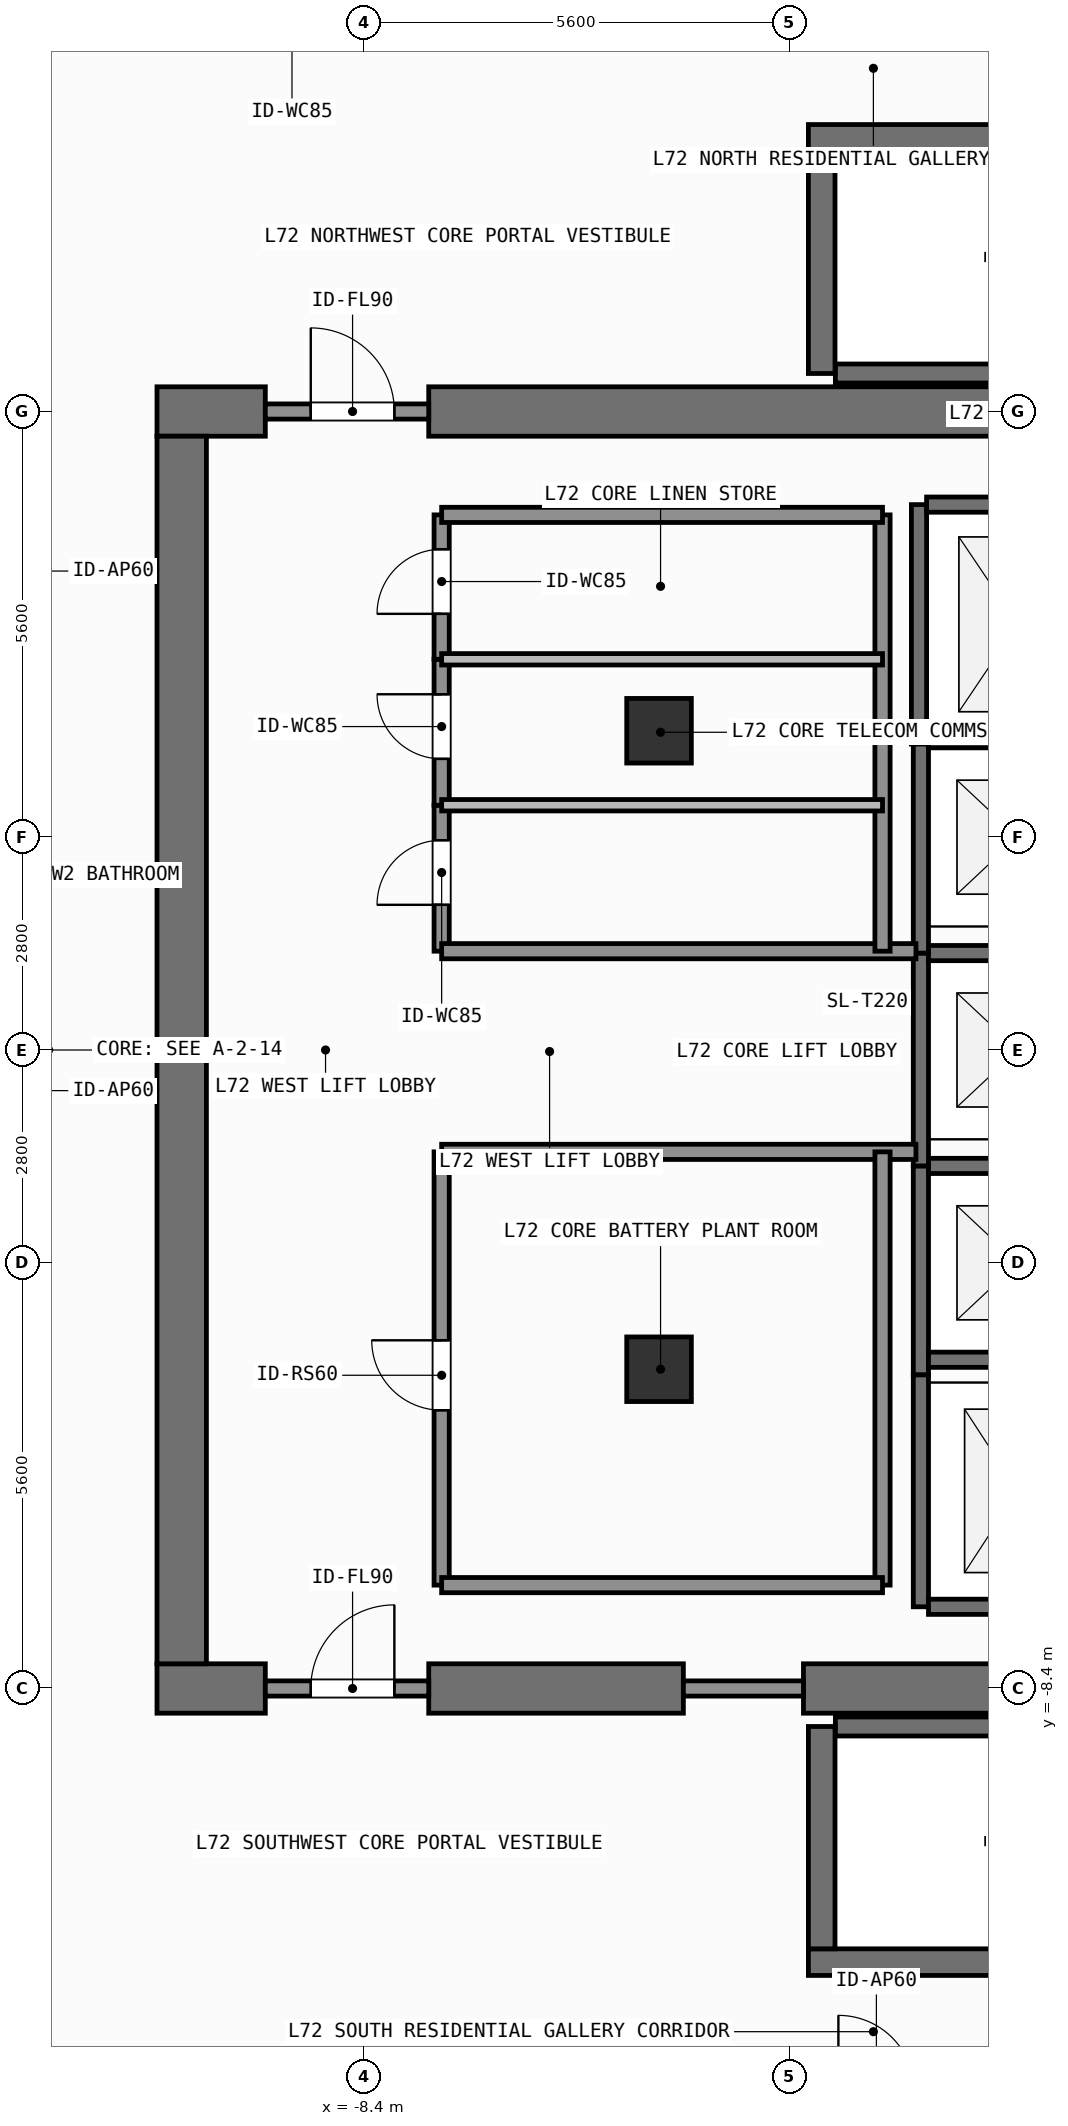
"""IFC4 building model, lengths in metres.
Left out: names, types, materials, properties, quantities, classifications, styles, units other than length and angle.
Written with IfcOpenShell. Run it as: python <this file> out.ifc"""

import sys

from ifc_helpers import new_model, si_unit, direction, frame, frame_2d, origin, origin_2d, place, context, subcontext, project, spatial, rectangle, extrude, element, fill, save


model = new_model("IFC4")
c1 = context("Model", 3, precision=1e-05, world=origin(), true_north=direction((0.0, 1.0)))
c2 = subcontext(c1, "Body", "Model", "MODEL_VIEW")
j1 = project(units=[si_unit("LENGTHUNIT", "METRE"), si_unit("PLANEANGLEUNIT", "RADIAN")], contexts=[c1])
p1 = place(None, origin())
s1 = spatial("IfcSite", under=j1, at=p1, CompositionType="ELEMENT")
p2 = place(p1, origin())
s2 = spatial("IfcBuilding", under=s1, at=p2, CompositionType="ELEMENT")
p3 = place(p2, frame((0.0, 0.0, 293.7)))
s3 = spatial("IfcBuildingStorey", under=s2, at=p3, CompositionType="ELEMENT", Elevation=293.7)
p4 = place(p3, frame((-11.125, -8.4, 0.0), z_axis=(0.0, 0.0, 1.0), x_axis=(1.0, 0.0, 0.0)))
e1 = element("IfcWall", 1, at=p4, inside=s3, PredefinedType="SHEAR", context=c2, shape_type="SweptSolid", body=[
    extrude(rectangle(XDim=1.425, YDim=0.65, at=frame_2d((0.712, 0.0))), origin(), (0.0, 0.0, 1.0), 3.9),
])
p5 = place(p3, frame((-7.55, -8.4, 0.0), z_axis=(0.0, 0.0, 1.0), x_axis=(1.0, 0.0, 0.0)))
e2 = element("IfcWall", 2, at=p5, inside=s3, PredefinedType="SHEAR", context=c2, shape_type="SweptSolid", body=[
    extrude(rectangle(XDim=3.35, YDim=0.65, at=frame_2d((1.675, 0.0))), origin(), (0.0, 0.0, 1.0), 3.9),
])
p6 = place(p3, frame((-2.62, -8.4, 0.0), z_axis=(0.0, 0.0, 1.0), x_axis=(1.0, 0.0, 0.0)))
e3 = element("IfcWall", 3, at=p6, inside=s3, PredefinedType="SHEAR", context=c2, shape_type="SweptSolid", body=[
    extrude(rectangle(XDim=7.27, YDim=0.65, at=frame_2d((3.635, 0.0))), origin(), (0.0, 0.0, 1.0), 3.9),
])
p7 = place(p3, frame((-11.125, 8.4, 0.0), z_axis=(0.0, 0.0, 1.0), x_axis=(1.0, 0.0, 0.0)))
e4 = element("IfcWall", 4, at=p7, inside=s3, PredefinedType="SHEAR", context=c2, shape_type="SweptSolid", body=[
    extrude(rectangle(XDim=1.425, YDim=0.65, at=frame_2d((0.712, 0.0))), origin(), (0.0, 0.0, 1.0), 3.9),
])
p8 = place(p3, frame((-7.55, 8.4, 0.0), z_axis=(0.0, 0.0, 1.0), x_axis=(1.0, 0.0, 0.0)))
e5 = element("IfcWall", 5, at=p8, inside=s3, PredefinedType="SHEAR", context=c2, shape_type="SweptSolid", body=[
    extrude(rectangle(XDim=16.275, YDim=0.65, at=frame_2d((8.138, 0.0))), origin(), (0.0, 0.0, 1.0), 3.9),
])
p9 = place(p3, frame((-10.8, -8.075, 0.0), z_axis=(0.0, 0.0, 1.0), x_axis=(0.0, 1.0, 0.0)))
e6 = element("IfcWall", 6, at=p9, inside=s3, PredefinedType="SHEAR", context=c2, shape_type="SweptSolid", body=[
    extrude(rectangle(XDim=16.15, YDim=0.65, at=frame_2d((8.075, 0.0))), origin(), (0.0, 0.0, 1.0), 3.9),
])
p10 = place(p3, frame((-2.555, -12.0, 0.0), z_axis=(0.0, 0.0, 1.0), x_axis=(1.0, 0.0, 0.0)))
e7 = element("IfcWall", 7, at=p10, inside=s3, PredefinedType="SHEAR", context=c2, shape_type="SweptSolid", body=[
    extrude(rectangle(XDim=7.31, YDim=0.35, at=frame_2d((3.655, 0.0))), origin(), (0.0, 0.0, 1.0), 3.9),
])
p11 = place(p3, frame((-2.2, -8.9, 0.0), z_axis=(0.0, 0.0, 1.0), x_axis=(1.0, 0.0, 0.0)))
e8 = element("IfcWall", 8, at=p11, inside=s3, PredefinedType="SHEAR", context=c2, shape_type="SweptSolid", body=[
    extrude(rectangle(XDim=6.6, YDim=0.25, at=frame_2d((3.3, 0.0))), origin(), (0.0, 0.0, 1.0), 3.9),
])
p12 = place(p3, frame((-2.38, -11.825, 0.0), z_axis=(0.0, 0.0, 1.0), x_axis=(0.0, 1.0, 0.0)))
e9 = element("IfcWall", 9, at=p12, inside=s3, PredefinedType="SHEAR", context=c2, shape_type="SweptSolid", body=[
    extrude(rectangle(XDim=2.925, YDim=0.35, at=frame_2d((1.462, 0.0))), origin(), (0.0, 0.0, 1.0), 3.9),
])
p13 = place(p3, frame((-2.555, 12.0, 0.0), z_axis=(0.0, 0.0, 1.0), x_axis=(1.0, 0.0, 0.0)))
e10 = element("IfcWall", 10, at=p13, inside=s3, PredefinedType="SHEAR", context=c2, shape_type="SweptSolid", body=[
    extrude(rectangle(XDim=7.31, YDim=0.35, at=frame_2d((3.655, 0.0))), origin(), (0.0, 0.0, 1.0), 3.9),
])
p14 = place(p3, frame((-2.2, 8.9, 0.0), z_axis=(0.0, 0.0, 1.0), x_axis=(1.0, 0.0, 0.0)))
e11 = element("IfcWall", 11, at=p14, inside=s3, PredefinedType="SHEAR", context=c2, shape_type="SweptSolid", body=[
    extrude(rectangle(XDim=6.6, YDim=0.25, at=frame_2d((3.3, 0.0))), origin(), (0.0, 0.0, 1.0), 3.9),
])
p15 = place(p3, frame((-2.38, 8.9, 0.0), z_axis=(0.0, 0.0, 1.0), x_axis=(0.0, 1.0, 0.0)))
e12 = element("IfcWall", 12, at=p15, inside=s3, PredefinedType="SHEAR", context=c2, shape_type="SweptSolid", body=[
    extrude(rectangle(XDim=2.925, YDim=0.35, at=frame_2d((1.462, 0.0))), origin(), (0.0, 0.0, 1.0), 3.9),
])
for number, where, z_axis, x_axis in (
    (13, (-4.52, -4.2, 0.0), (0.0, 0.0, 1.0), (1.0, 0.0, 0.0)),
    (14, (-4.52, 4.2, 0.0), (0.0, 0.0, 1.0), (1.0, 0.0, 0.0)),
):
    element("IfcColumn", number, at=place(p3, frame(where, z_axis=z_axis, x_axis=x_axis)), inside=s3, PredefinedType="COLUMN", context=c2, shape_type="SweptSolid", body=[
        extrude(rectangle(XDim=0.85, YDim=0.85, at=origin_2d()), origin(), (0.0, 0.0, 1.0), 3.9),
    ])
p16 = place(p3, frame((-1.075, -4.275, 0.0), z_axis=(0.0, 0.0, 1.0), x_axis=(0.0, 1.0, 0.0)))
e15 = element("IfcWall", 15, at=p16, inside=s3, PredefinedType="SHEAR", context=c2, shape_type="SweptSolid", body=[
    extrude(rectangle(XDim=2.75, YDim=0.2, at=frame_2d((1.375, 0.0))), origin(), (0.0, 0.0, 1.0), 3.68),
])
for number, where, z_axis, x_axis in (
    (16, (-0.975, -4.075, 0.0), (0.0, 0.0, 1.0), (1.0, 0.0, 0.0)),
    (17, (-0.975, -1.525, 0.0), (0.0, 0.0, 1.0), (1.0, 0.0, 0.0)),
):
    element("IfcWall", number, at=place(p3, frame(where, z_axis=z_axis, x_axis=x_axis)), inside=s3, PredefinedType="SHEAR", context=c2, shape_type="SweptSolid", body=[
        extrude(rectangle(XDim=2.35, YDim=0.2, at=frame_2d((1.175, 0.0))), origin(), (0.0, 0.0, 1.0), 3.68),
    ])
p17 = place(p3, frame((-1.075, -1.525, 0.0), z_axis=(0.0, 0.0, 1.0), x_axis=(0.0, 1.0, 0.0)))
e18 = element("IfcWall", 18, at=p17, inside=s3, PredefinedType="SHEAR", context=c2, shape_type="SweptSolid", body=[
    extrude(rectangle(XDim=2.8, YDim=0.2, at=frame_2d((1.4, 0.0))), origin(), (0.0, 0.0, 1.0), 3.68),
])
p18 = place(p3, frame((-0.975, 1.275, 0.0), z_axis=(0.0, 0.0, 1.0), x_axis=(1.0, 0.0, 0.0)))
e19 = element("IfcWall", 19, at=p18, inside=s3, PredefinedType="SHEAR", context=c2, shape_type="SweptSolid", body=[
    extrude(rectangle(XDim=2.35, YDim=0.2, at=frame_2d((1.175, 0.0))), origin(), (0.0, 0.0, 1.0), 3.68),
])
p19 = place(p3, frame((-1.075, 1.275, 0.0), z_axis=(0.0, 0.0, 1.0), x_axis=(0.0, 1.0, 0.0)))
e20 = element("IfcWall", 20, at=p19, inside=s3, PredefinedType="SHEAR", context=c2, shape_type="SweptSolid", body=[
    extrude(rectangle(XDim=2.8, YDim=0.2, at=frame_2d((1.4, 0.0))), origin(), (0.0, 0.0, 1.0), 3.68),
])
p20 = place(p3, frame((-0.975, 4.075, 0.0), z_axis=(0.0, 0.0, 1.0), x_axis=(1.0, 0.0, 0.0)))
e21 = element("IfcWall", 21, at=p20, inside=s3, PredefinedType="SHEAR", context=c2, shape_type="SweptSolid", body=[
    extrude(rectangle(XDim=2.35, YDim=0.2, at=frame_2d((1.175, 0.0))), origin(), (0.0, 0.0, 1.0), 3.68),
])
p21 = place(p3, frame((-1.1, 4.025, 0.0), z_axis=(0.0, 0.0, 1.0), x_axis=(0.0, 1.0, 0.0)))
e22 = element("IfcWall", 22, at=p21, inside=s3, PredefinedType="SHEAR", context=c2, shape_type="SweptSolid", body=[
    extrude(rectangle(XDim=3.15, YDim=0.2, at=frame_2d((1.575, 0.0))), origin(), (0.0, 0.0, 1.0), 3.68),
])
p22 = place(p3, frame((-1.0, 7.175, 0.0), z_axis=(0.0, 0.0, 1.0), x_axis=(1.0, 0.0, 0.0)))
e23 = element("IfcWall", 23, at=p22, inside=s3, PredefinedType="SHEAR", context=c2, shape_type="SweptSolid", body=[
    extrude(rectangle(XDim=2.4, YDim=0.2, at=frame_2d((1.2, 0.0))), origin(), (0.0, 0.0, 1.0), 3.68),
])
p23 = place(p3, frame((-1.075, -7.325, 0.0), z_axis=(0.0, 0.0, 1.0), x_axis=(0.0, 1.0, 0.0)))
e24 = element("IfcWall", 24, at=p23, inside=s3, PredefinedType="SHEAR", context=c2, shape_type="SweptSolid", body=[
    extrude(rectangle(XDim=3.05, YDim=0.2, at=frame_2d((1.525, 0.0))), origin(), (0.0, 0.0, 1.0), 3.68),
])
p24 = place(p3, frame((-0.975, -7.325, 0.0), z_axis=(0.0, 0.0, 1.0), x_axis=(1.0, 0.0, 0.0)))
e25 = element("IfcWall", 25, at=p24, inside=s3, PredefinedType="SHEAR", context=c2, shape_type="SweptSolid", body=[
    extrude(rectangle(XDim=2.35, YDim=0.2, at=frame_2d((1.175, 0.0))), origin(), (0.0, 0.0, 1.0), 3.68),
])
p25 = place(p3, frame((-9.7, -8.4, 0.0), z_axis=(0.0, 0.0, 1.0), x_axis=(1.0, 0.0, 0.0)))
e26 = element("IfcWall", 26, at=p25, inside=s3, PredefinedType="SOLIDWALL", context=c2, shape_type="SweptSolid", body=[
    extrude(rectangle(XDim=2.15, YDim=0.2, at=frame_2d((1.075, 0.0))), origin(), (0.0, 0.0, 1.0), 2.92),
])
p26 = place(p25, frame((0.598, 0.0, 0.0)))
e27 = element("IfcOpeningElement", 27, at=p26, cuts=e26, PredefinedType="OPENING", context=c2, shape_type="SweptSolid", body=[
    extrude(rectangle(XDim=1.1, YDim=2.15, at=frame_2d((0.55, 1.075))), frame((0.0, 0.11, 0.0), z_axis=(0.0, -1.0, 0.0), x_axis=(1.0, 0.0, 0.0)), (0.0, 0.0, 1.0), 0.22),
])
p27 = place(p3, frame((-9.7, 8.4, 0.0), z_axis=(0.0, 0.0, 1.0), x_axis=(1.0, 0.0, 0.0)))
e28 = element("IfcWall", 28, at=p27, inside=s3, PredefinedType="SOLIDWALL", context=c2, shape_type="SweptSolid", body=[
    extrude(rectangle(XDim=2.15, YDim=0.2, at=frame_2d((1.075, 0.0))), origin(), (0.0, 0.0, 1.0), 2.92),
])
p28 = place(p27, frame((0.598, 0.0, 0.0)))
e29 = element("IfcOpeningElement", 29, at=p28, cuts=e28, PredefinedType="OPENING", context=c2, shape_type="SweptSolid", body=[
    extrude(rectangle(XDim=1.1, YDim=2.15, at=frame_2d((0.55, 1.075))), frame((0.0, 0.11, 0.0), z_axis=(0.0, -1.0, 0.0), x_axis=(1.0, 0.0, 0.0)), (0.0, 0.0, 1.0), 0.22),
])
p29 = place(p3, frame((-7.38, -7.04, 0.0), z_axis=(0.0, 0.0, 1.0), x_axis=(0.0, 1.0, 0.0)))
e30 = element("IfcWall", 30, at=p29, inside=s3, PredefinedType="SOLIDWALL", context=c2, shape_type="SweptSolid", body=[
    extrude(rectangle(XDim=5.7, YDim=0.2, at=frame_2d((2.85, 0.0))), origin(), (0.0, 0.0, 1.0), 3.68),
])
p30 = place(p29, frame((2.301, 0.0, 0.0)))
e31 = element("IfcOpeningElement", 31, at=p30, cuts=e30, PredefinedType="OPENING", context=c2, shape_type="SweptSolid", body=[
    extrude(rectangle(XDim=0.92, YDim=2.1, at=frame_2d((0.46, 1.05))), frame((0.0, 0.11, 0.0), z_axis=(0.0, -1.0, 0.0), x_axis=(1.0, 0.0, 0.0)), (0.0, 0.0, 1.0), 0.22),
])
p31 = place(p3, frame((-7.38, 1.3, 0.0), z_axis=(0.0, 0.0, 1.0), x_axis=(0.0, 1.0, 0.0)))
e32 = element("IfcWall", 32, at=p31, inside=s3, PredefinedType="SOLIDWALL", context=c2, shape_type="SweptSolid", body=[
    extrude(rectangle(XDim=1.92, YDim=0.2, at=frame_2d((0.96, 0.0))), origin(), (0.0, 0.0, 1.0), 3.68),
])
p32 = place(p31, frame((0.61, 0.0, 0.0)))
e33 = element("IfcOpeningElement", 33, at=p32, cuts=e32, PredefinedType="OPENING", context=c2, shape_type="SweptSolid", body=[
    extrude(rectangle(XDim=0.85, YDim=2.1, at=frame_2d((0.425, 1.05))), frame((0.0, 0.11, 0.0), z_axis=(0.0, -1.0, 0.0), x_axis=(1.0, 0.0, 0.0)), (0.0, 0.0, 1.0), 0.22),
])
p33 = place(p3, frame((-7.38, 3.22, 0.0), z_axis=(0.0, 0.0, 1.0), x_axis=(0.0, 1.0, 0.0)))
e34 = element("IfcWall", 34, at=p33, inside=s3, PredefinedType="SOLIDWALL", context=c2, shape_type="SweptSolid", body=[
    extrude(rectangle(XDim=1.92, YDim=0.2, at=frame_2d((0.96, 0.0))), origin(), (0.0, 0.0, 1.0), 3.68),
])
p34 = place(p33, frame((0.61, 0.0, 0.0)))
e35 = element("IfcOpeningElement", 35, at=p34, cuts=e34, PredefinedType="OPENING", context=c2, shape_type="SweptSolid", body=[
    extrude(rectangle(XDim=0.85, YDim=2.1, at=frame_2d((0.425, 1.05))), frame((0.0, 0.11, 0.0), z_axis=(0.0, -1.0, 0.0), x_axis=(1.0, 0.0, 0.0)), (0.0, 0.0, 1.0), 0.22),
])
p35 = place(p3, frame((-7.38, 5.14, 0.0), z_axis=(0.0, 0.0, 1.0), x_axis=(0.0, 1.0, 0.0)))
e36 = element("IfcWall", 36, at=p35, inside=s3, PredefinedType="SOLIDWALL", context=c2, shape_type="SweptSolid", body=[
    extrude(rectangle(XDim=1.9, YDim=0.2, at=frame_2d((0.95, 0.0))), origin(), (0.0, 0.0, 1.0), 3.68),
])
p36 = place(p35, frame((0.598, 0.0, 0.0)))
e37 = element("IfcOpeningElement", 37, at=p36, cuts=e36, PredefinedType="OPENING", context=c2, shape_type="SweptSolid", body=[
    extrude(rectangle(XDim=0.85, YDim=2.1, at=frame_2d((0.425, 1.05))), frame((0.0, 0.11, 0.0), z_axis=(0.0, -1.0, 0.0), x_axis=(1.0, 0.0, 0.0)), (0.0, 0.0, 1.0), 0.22),
])
p37 = place(p3, frame((-4.2, -8.4, 0.0), z_axis=(0.0, 0.0, 1.0), x_axis=(1.0, 0.0, 0.0)))
e38 = element("IfcWall", 38, at=p37, inside=s3, PredefinedType="SOLIDWALL", context=c2, shape_type="SweptSolid", body=[
    extrude(rectangle(XDim=1.58, YDim=0.2, at=frame_2d((0.79, 0.0))), origin(), (0.0, 0.0, 1.0), 2.92),
])
for number, where, z_axis, x_axis in (
    (39, (-7.38, -1.34, 0.0), (0.0, 0.0, 1.0), (1.0, 0.0, 0.0)),
    (40, (-7.38, 1.3, 0.0), (0.0, 0.0, 1.0), (1.0, 0.0, 0.0)),
):
    element("IfcWall", number, at=place(p3, frame(where, z_axis=z_axis, x_axis=x_axis)), inside=s3, PredefinedType="SOLIDWALL", context=c2, shape_type="SweptSolid", body=[
        extrude(rectangle(XDim=6.24, YDim=0.2, at=frame_2d((3.12, 0.0))), origin(), (0.0, 0.0, 1.0), 3.68),
    ])
p38 = place(p3, frame((-1.58, -7.04, 0.0), z_axis=(0.0, 0.0, 1.0), x_axis=(0.0, 1.0, 0.0)))
e41 = element("IfcWall", 41, at=p38, inside=s3, PredefinedType="SOLIDWALL", context=c2, shape_type="SweptSolid", body=[
    extrude(rectangle(XDim=5.7, YDim=0.2, at=frame_2d((2.85, 0.0))), origin(), (0.0, 0.0, 1.0), 3.68),
])
p39 = place(p3, frame((-7.38, -7.04, 0.0), z_axis=(0.0, 0.0, 1.0), x_axis=(1.0, 0.0, 0.0)))
e42 = element("IfcWall", 42, at=p39, inside=s3, PredefinedType="SOLIDWALL", context=c2, shape_type="SweptSolid", body=[
    extrude(rectangle(XDim=5.8, YDim=0.2, at=frame_2d((2.9, 0.0))), origin(), (0.0, 0.0, 1.0), 3.68),
])
p40 = place(p3, frame((-1.58, 1.3, 0.0), z_axis=(0.0, 0.0, 1.0), x_axis=(0.0, 1.0, 0.0)))
e43 = element("IfcWall", 43, at=p40, inside=s3, PredefinedType="SOLIDWALL", context=c2, shape_type="SweptSolid", body=[
    extrude(rectangle(XDim=5.74, YDim=0.2, at=frame_2d((2.87, 0.0))), origin(), (0.0, 0.0, 1.0), 3.68),
])
p41 = place(p3, frame((-7.38, 7.04, 0.0), z_axis=(0.0, 0.0, 1.0), x_axis=(1.0, 0.0, 0.0)))
e44 = element("IfcWall", 44, at=p41, inside=s3, PredefinedType="SOLIDWALL", context=c2, shape_type="SweptSolid", body=[
    extrude(rectangle(XDim=5.8, YDim=0.2, at=frame_2d((2.9, 0.0))), origin(), (0.0, 0.0, 1.0), 3.68),
])
for number, where, z_axis, x_axis in (
    (45, (-7.38, 3.22, 0.0), (0.0, 0.0, 1.0), (1.0, 0.0, 0.0)),
    (46, (-7.38, 5.14, 0.0), (0.0, 0.0, 1.0), (1.0, 0.0, 0.0)),
):
    element("IfcWall", number, at=place(p3, frame(where, z_axis=z_axis, x_axis=x_axis)), inside=s3, PredefinedType="PARTITIONING", context=c2, shape_type="SweptSolid", body=[
        extrude(rectangle(XDim=5.8, YDim=0.15, at=frame_2d((2.9, 0.0))), origin(), (0.0, 0.0, 1.0), 3.68),
    ])
p42 = place(p26, origin())
e47 = element("IfcDoor", 47, at=p42, inside=s3, OperationType="SINGLE_SWING_RIGHT", PredefinedType="DOOR", context=c2, shape_type="SweptSolid", body=[
    extrude(rectangle(XDim=1.1, YDim=2.15, at=frame_2d((0.55, 1.075))), frame((0.0, 0.025, 0.0), z_axis=(0.0, -1.0, 0.0), x_axis=(1.0, 0.0, 0.0)), (0.0, 0.0, 1.0), 0.05),
])
fill(e27, e47)
p43 = place(p28, origin())
e48 = element("IfcDoor", 48, at=p43, inside=s3, OperationType="SINGLE_SWING_LEFT", PredefinedType="DOOR", context=c2, shape_type="SweptSolid", body=[
    extrude(rectangle(XDim=1.1, YDim=2.15, at=frame_2d((0.55, 1.075))), frame((0.0, 0.025, 0.0), z_axis=(0.0, -1.0, 0.0), x_axis=(1.0, 0.0, 0.0)), (0.0, 0.0, 1.0), 0.05),
])
fill(e29, e48)
p44 = place(p30, origin())
e49 = element("IfcDoor", 49, at=p44, inside=s3, OperationType="SINGLE_SWING_RIGHT", PredefinedType="DOOR", context=c2, shape_type="SweptSolid", body=[
    extrude(rectangle(XDim=0.92, YDim=2.1, at=frame_2d((0.46, 1.05))), frame((0.0, 0.025, 0.0), z_axis=(0.0, -1.0, 0.0), x_axis=(1.0, 0.0, 0.0)), (0.0, 0.0, 1.0), 0.05),
])
fill(e31, e49)
p45 = place(p32, origin())
e50 = element("IfcDoor", 50, at=p45, inside=s3, OperationType="SINGLE_SWING_LEFT", PredefinedType="DOOR", context=c2, shape_type="SweptSolid", body=[
    extrude(rectangle(XDim=0.85, YDim=2.1, at=frame_2d((0.425, 1.05))), frame((0.0, 0.025, 0.0), z_axis=(0.0, -1.0, 0.0), x_axis=(1.0, 0.0, 0.0)), (0.0, 0.0, 1.0), 0.05),
])
fill(e33, e50)
p46 = place(p34, origin())
e51 = element("IfcDoor", 51, at=p46, inside=s3, OperationType="SINGLE_SWING_RIGHT", PredefinedType="DOOR", context=c2, shape_type="SweptSolid", body=[
    extrude(rectangle(XDim=0.85, YDim=2.1, at=frame_2d((0.425, 1.05))), frame((0.0, 0.025, 0.0), z_axis=(0.0, -1.0, 0.0), x_axis=(1.0, 0.0, 0.0)), (0.0, 0.0, 1.0), 0.05),
])
fill(e35, e51)
p47 = place(p36, origin())
e52 = element("IfcDoor", 52, at=p47, inside=s3, OperationType="SINGLE_SWING_LEFT", PredefinedType="DOOR", context=c2, shape_type="SweptSolid", body=[
    extrude(rectangle(XDim=0.85, YDim=2.1, at=frame_2d((0.425, 1.05))), frame((0.0, 0.025, 0.0), z_axis=(0.0, -1.0, 0.0), x_axis=(1.0, 0.0, 0.0)), (0.0, 0.0, 1.0), 0.05),
])
fill(e37, e52)
save(model, sys.argv[1])
